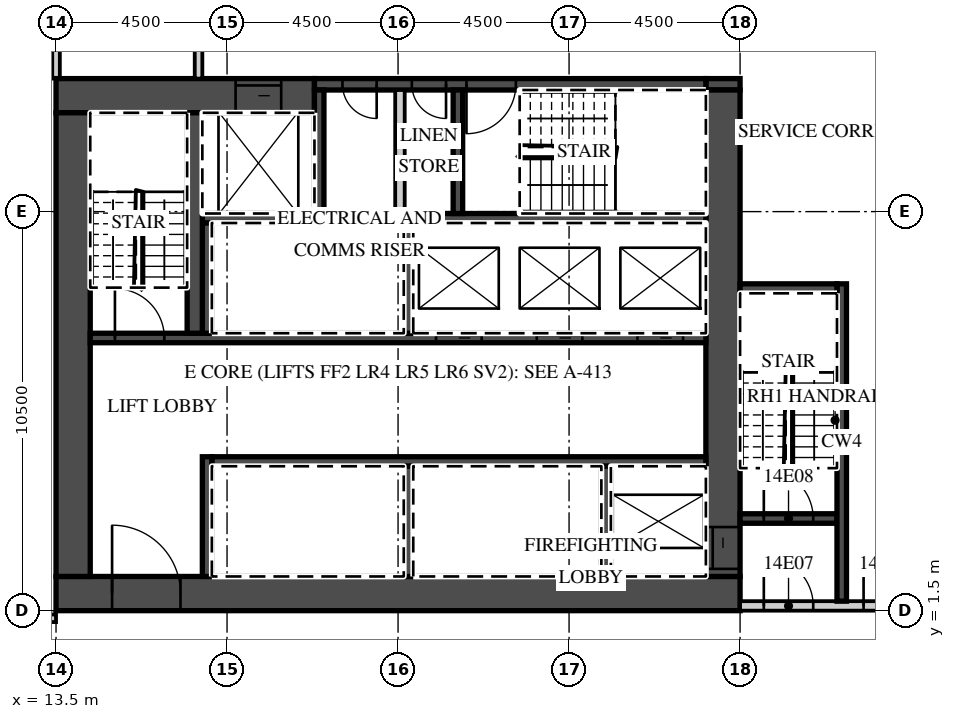
"""IFC4 building model, lengths in metres.
Left out: names, types, materials, properties, quantities, classifications, styles, units other than length and angle.
Written with IfcOpenShell. Run it as: python <this file> out.ifc"""

import sys

from ifc_helpers import new_model, si_unit, direction, frame, frame_2d, origin, place, context, subcontext, project, spatial, rectangle, extrude, element, fill, save


model = new_model("IFC4")
c1 = context("Model", 3, precision=1e-05, world=origin(), true_north=direction((0.0, 1.0)))
c2 = subcontext(c1, "Body", "Model", "MODEL_VIEW")
j1 = project(units=[si_unit("LENGTHUNIT", "METRE"), si_unit("PLANEANGLEUNIT", "RADIAN")], contexts=[c1])
p1 = place(None, origin())
s1 = spatial("IfcSite", under=j1, at=p1, CompositionType="ELEMENT")
p2 = place(p1, origin())
s2 = spatial("IfcBuilding", under=s1, at=p2, CompositionType="ELEMENT")
p3 = place(p2, frame((0.0, 0.0, 76.5)))
s3 = spatial("IfcBuildingStorey", under=s2, at=p3, CompositionType="ELEMENT", Elevation=76.5)
p4 = place(p3, frame((13.5, 15.5, 0.0), z_axis=(0.0, 0.0, 1.0), x_axis=(0.0, 1.0, 0.0)))
e1 = element("IfcWall", 1, at=p4, inside=s3, PredefinedType="PARTITIONING", context=c2, shape_type="SweptSolid", body=[
    extrude(rectangle(XDim=6.05, YDim=0.2, at=frame_2d((3.025, 0.0))), origin(), (0.0, 0.0, 1.0), 3.02),
])
p5 = place(p3, frame((-44.55, 1.3, 0.0), z_axis=(0.0, 0.0, 1.0), x_axis=(1.0, 0.0, 0.0)))
e2 = element("IfcWall", 2, at=p5, inside=s3, PredefinedType="PARTITIONING", context=c2, shape_type="SweptSolid", body=[
    extrude(rectangle(XDim=58.05, YDim=0.2, at=frame_2d((29.025, 0.0))), origin(), (0.0, 0.0, 1.0), 3.02),
])
p6 = place(p5, frame((0.525, 0.0, 0.0)))
e3 = element("IfcOpeningElement", 3, at=p6, cuts=e2, PredefinedType="OPENING", context=c2, shape_type="SweptSolid", body=[
    extrude(rectangle(XDim=1.0, YDim=2.1, at=frame_2d((0.5, 1.05))), frame((0.0, 0.11, 0.0), z_axis=(0.0, -1.0, 0.0), x_axis=(1.0, 0.0, 0.0)), (0.0, 0.0, 1.0), 0.22),
])
p7 = place(p5, frame((6.975, 0.0, 0.0)))
e4 = element("IfcOpeningElement", 4, at=p7, cuts=e2, PredefinedType="OPENING", context=c2, shape_type="SweptSolid", body=[
    extrude(rectangle(XDim=1.0, YDim=2.1, at=frame_2d((0.5, 1.05))), frame((0.0, 0.11, 0.0), z_axis=(0.0, -1.0, 0.0), x_axis=(1.0, 0.0, 0.0)), (0.0, 0.0, 1.0), 0.22),
])
p8 = place(p5, frame((9.125, 0.0, 0.0)))
e5 = element("IfcOpeningElement", 5, at=p8, cuts=e2, PredefinedType="OPENING", context=c2, shape_type="SweptSolid", body=[
    extrude(rectangle(XDim=1.0, YDim=2.1, at=frame_2d((0.5, 1.05))), frame((0.0, 0.11, 0.0), z_axis=(0.0, -1.0, 0.0), x_axis=(1.0, 0.0, 0.0)), (0.0, 0.0, 1.0), 0.22),
])
p9 = place(p5, frame((13.6, 0.0, 0.0)))
e6 = element("IfcOpeningElement", 6, at=p9, cuts=e2, PredefinedType="OPENING", context=c2, shape_type="SweptSolid", body=[
    extrude(rectangle(XDim=1.0, YDim=2.1, at=frame_2d((0.5, 1.05))), frame((0.0, 0.11, 0.0), z_axis=(0.0, -1.0, 0.0), x_axis=(1.0, 0.0, 0.0)), (0.0, 0.0, 1.0), 0.22),
])
p10 = place(p5, frame((19.987, 0.0, 0.0)))
e7 = element("IfcOpeningElement", 7, at=p10, cuts=e2, PredefinedType="OPENING", context=c2, shape_type="SweptSolid", body=[
    extrude(rectangle(XDim=1.2, YDim=2.1, at=frame_2d((0.6, 1.05))), frame((0.0, 0.11, 0.0), z_axis=(0.0, -1.0, 0.0), x_axis=(1.0, 0.0, 0.0)), (0.0, 0.0, 1.0), 0.22),
])
p11 = place(p5, frame((31.912, 0.0, 0.0)))
e8 = element("IfcOpeningElement", 8, at=p11, cuts=e2, PredefinedType="OPENING", context=c2, shape_type="SweptSolid", body=[
    extrude(rectangle(XDim=1.2, YDim=2.1, at=frame_2d((0.6, 1.05))), frame((0.0, 0.11, 0.0), z_axis=(0.0, -1.0, 0.0), x_axis=(1.0, 0.0, 0.0)), (0.0, 0.0, 1.0), 0.22),
])
p12 = place(p5, frame((38.5, 0.0, 0.0)))
e9 = element("IfcOpeningElement", 9, at=p12, cuts=e2, PredefinedType="OPENING", context=c2, shape_type="SweptSolid", body=[
    extrude(rectangle(XDim=1.0, YDim=2.1, at=frame_2d((0.5, 1.05))), frame((0.0, 0.11, 0.0), z_axis=(0.0, -1.0, 0.0), x_axis=(1.0, 0.0, 0.0)), (0.0, 0.0, 1.0), 0.22),
])
p13 = place(p5, frame((40.6, 0.0, 0.0)))
e10 = element("IfcOpeningElement", 10, at=p13, cuts=e2, PredefinedType="OPENING", context=c2, shape_type="SweptSolid", body=[
    extrude(rectangle(XDim=1.0, YDim=2.1, at=frame_2d((0.5, 1.05))), frame((0.0, 0.11, 0.0), z_axis=(0.0, -1.0, 0.0), x_axis=(1.0, 0.0, 0.0)), (0.0, 0.0, 1.0), 0.22),
])
p14 = place(p5, frame((47.5, 0.0, 0.0)))
e11 = element("IfcOpeningElement", 11, at=p14, cuts=e2, PredefinedType="OPENING", context=c2, shape_type="SweptSolid", body=[
    extrude(rectangle(XDim=1.0, YDim=2.1, at=frame_2d((0.5, 1.05))), frame((0.0, 0.11, 0.0), z_axis=(0.0, -1.0, 0.0), x_axis=(1.0, 0.0, 0.0)), (0.0, 0.0, 1.0), 0.22),
])
p15 = place(p5, frame((51.975, 0.0, 0.0)))
e12 = element("IfcOpeningElement", 12, at=p15, cuts=e2, PredefinedType="OPENING", context=c2, shape_type="SweptSolid", body=[
    extrude(rectangle(XDim=1.0, YDim=2.1, at=frame_2d((0.5, 1.05))), frame((0.0, 0.11, 0.0), z_axis=(0.0, -1.0, 0.0), x_axis=(1.0, 0.0, 0.0)), (0.0, 0.0, 1.0), 0.22),
])
p16 = place(p5, frame((56.475, 0.0, 0.0)))
e13 = element("IfcOpeningElement", 13, at=p16, cuts=e2, PredefinedType="OPENING", context=c2, shape_type="SweptSolid", body=[
    extrude(rectangle(XDim=1.0, YDim=2.1, at=frame_2d((0.5, 1.05))), frame((0.0, 0.11, 0.0), z_axis=(0.0, -1.0, 0.0), x_axis=(1.0, 0.0, 0.0)), (0.0, 0.0, 1.0), 0.22),
])
p17 = place(p3, frame((13.5, 1.95, 0.0), z_axis=(0.0, 0.0, 1.0), x_axis=(1.0, 0.0, 0.0)))
e14 = element("IfcWall", 14, at=p17, inside=s3, PredefinedType="SHEAR", context=c2, shape_type="SweptSolid", body=[
    extrude(rectangle(XDim=18.0, YDim=0.9, at=frame_2d((9.0, 0.0))), origin(), (0.0, 0.0, 1.0), 3.02),
])
p18 = place(p17, frame((1.475, 0.0, 0.0)))
e15 = element("IfcOpeningElement", 15, at=p18, cuts=e14, PredefinedType="OPENING", context=c2, shape_type="SweptSolid", body=[
    extrude(rectangle(XDim=1.8, YDim=2.1, at=frame_2d((0.9, 1.05))), frame((0.0, 0.46, 0.0), z_axis=(0.0, -1.0, 0.0), x_axis=(1.0, 0.0, 0.0)), (0.0, 0.0, 1.0), 0.92),
])
p19 = place(p3, frame((13.5, 15.05, 0.0), z_axis=(0.0, 0.0, 1.0), x_axis=(1.0, 0.0, 0.0)))
e16 = element("IfcWall", 16, at=p19, inside=s3, PredefinedType="SHEAR", context=c2, shape_type="SweptSolid", body=[
    extrude(rectangle(XDim=6.8, YDim=0.9, at=frame_2d((3.4, 0.0))), origin(), (0.0, 0.0, 1.0), 3.02),
])
p20 = place(p19, frame((4.725, 0.0, 0.0)))
e17 = element("IfcOpeningElement", 17, at=p20, cuts=e16, PredefinedType="OPENING", context=c2, shape_type="SweptSolid", body=[
    extrude(rectangle(XDim=1.2, YDim=2.1, at=frame_2d((0.6, 1.05))), frame((0.0, 0.46, 0.0), z_axis=(0.0, -1.0, 0.0), x_axis=(1.0, 0.0, 0.0)), (0.0, 0.0, 1.0), 0.92),
])
p21 = place(p3, frame((30.6, 15.35, 0.0), z_axis=(0.0, 0.0, 1.0), x_axis=(1.0, 0.0, 0.0)))
e18 = element("IfcWall", 18, at=p21, inside=s3, PredefinedType="SHEAR", context=c2, shape_type="SweptSolid", body=[
    extrude(rectangle(XDim=0.9, YDim=0.3, at=frame_2d((0.45, 0.0))), origin(), (0.0, 0.0, 1.0), 3.02),
])
p22 = place(p3, frame((20.3, 15.35, 0.0), z_axis=(0.0, 0.0, 1.0), x_axis=(1.0, 0.0, 0.0)))
e19 = element("IfcWall", 19, at=p22, inside=s3, PredefinedType="SHEAR", context=c2, shape_type="SweptSolid", body=[
    extrude(rectangle(XDim=10.3, YDim=0.3, at=frame_2d((5.15, 0.0))), origin(), (0.0, 0.0, 1.0), 3.02),
])
p23 = place(p22, frame((4.0, 0.0, 0.0)))
e20 = element("IfcOpeningElement", 20, at=p23, cuts=e19, PredefinedType="OPENING", context=c2, shape_type="SweptSolid", body=[
    extrude(rectangle(XDim=1.3, YDim=2.1, at=frame_2d((0.65, 1.05))), frame((0.0, 0.16, 0.0), z_axis=(0.0, -1.0, 0.0), x_axis=(1.0, 0.0, 0.0)), (0.0, 0.0, 1.0), 0.32),
])
p24 = place(p22, frame((2.562, 0.0, 0.0)))
e21 = element("IfcOpeningElement", 21, at=p24, cuts=e19, PredefinedType="OPENING", context=c2, shape_type="SweptSolid", body=[
    extrude(rectangle(XDim=0.9, YDim=2.1, at=frame_2d((0.45, 1.05))), frame((0.0, 0.16, 0.0), z_axis=(0.0, -1.0, 0.0), x_axis=(1.0, 0.0, 0.0)), (0.0, 0.0, 1.0), 0.32),
])
p25 = place(p22, frame((0.738, 0.0, 0.0)))
e22 = element("IfcOpeningElement", 22, at=p25, cuts=e19, PredefinedType="OPENING", context=c2, shape_type="SweptSolid", body=[
    extrude(rectangle(XDim=0.9, YDim=2.1, at=frame_2d((0.45, 1.05))), frame((0.0, 0.16, 0.0), z_axis=(0.0, -1.0, 0.0), x_axis=(1.0, 0.0, 0.0)), (0.0, 0.0, 1.0), 0.32),
])
p26 = place(p3, frame((31.05, 2.4, 0.0), z_axis=(0.0, 0.0, 1.0), x_axis=(0.0, 1.0, 0.0)))
e23 = element("IfcWall", 23, at=p26, inside=s3, PredefinedType="SHEAR", context=c2, shape_type="SweptSolid", body=[
    extrude(rectangle(XDim=12.8, YDim=0.9, at=frame_2d((6.4, 0.0))), origin(), (0.0, 0.0, 1.0), 3.02),
])
p27 = place(p26, frame((0.2, 0.0, 0.0)))
e24 = element("IfcOpeningElement", 24, at=p27, cuts=e23, PredefinedType="OPENING", context=c2, shape_type="SweptSolid", body=[
    extrude(rectangle(XDim=1.1, YDim=2.1, at=frame_2d((0.55, 1.05))), frame((0.0, 0.46, 0.0), z_axis=(0.0, -1.0, 0.0), x_axis=(1.0, 0.0, 0.0)), (0.0, 0.0, 1.0), 0.92),
])
p28 = place(p3, frame((13.95, 2.4, 0.0), z_axis=(0.0, 0.0, 1.0), x_axis=(0.0, 1.0, 0.0)))
e25 = element("IfcWall", 25, at=p28, inside=s3, PredefinedType="SHEAR", context=c2, shape_type="SweptSolid", body=[
    extrude(rectangle(XDim=12.2, YDim=0.9, at=frame_2d((6.1, 0.0))), origin(), (0.0, 0.0, 1.0), 3.02),
])
p29 = place(p3, frame((17.6, 5.425, 0.0), z_axis=(0.0, 0.0, 1.0), x_axis=(1.0, 0.0, 0.0)))
e26 = element("IfcWall", 26, at=p29, inside=s3, PredefinedType="SHEAR", context=c2, shape_type="SweptSolid", body=[
    extrude(rectangle(XDim=13.0, YDim=0.25, at=frame_2d((6.5, 0.0))), origin(), (0.0, 0.0, 1.0), 3.02),
])
p30 = place(p3, frame((17.475, 2.4, 0.0), z_axis=(0.0, 0.0, 1.0), x_axis=(0.0, 1.0, 0.0)))
e27 = element("IfcWall", 27, at=p30, inside=s3, PredefinedType="SHEAR", context=c2, shape_type="SweptSolid", body=[
    extrude(rectangle(XDim=3.15, YDim=0.25, at=frame_2d((1.575, 0.0))), origin(), (0.0, 0.0, 1.0), 3.02),
])
for number, where, z_axis, x_axis in (
    (28, (27.975, 2.4, 0.0), (0.0, 0.0, 1.0), (0.0, 1.0, 0.0)),
    (29, (22.775, 2.4, 0.0), (0.0, 0.0, 1.0), (0.0, 1.0, 0.0)),
):
    element("IfcWall", number, at=place(p3, frame(where, z_axis=z_axis, x_axis=x_axis)), inside=s3, PredefinedType="SHEAR", context=c2, shape_type="SweptSolid", body=[
        extrude(rectangle(XDim=2.9, YDim=0.25, at=frame_2d((1.45, 0.0))), origin(), (0.0, 0.0, 1.0), 3.02),
    ])
p31 = place(p3, frame((14.4, 8.675, 0.0), z_axis=(0.0, 0.0, 1.0), x_axis=(1.0, 0.0, 0.0)))
e30 = element("IfcWall", 30, at=p31, inside=s3, PredefinedType="SHEAR", context=c2, shape_type="SweptSolid", body=[
    extrude(rectangle(XDim=16.2, YDim=0.25, at=frame_2d((8.1, 0.0))), origin(), (0.0, 0.0, 1.0), 3.02),
])
p32 = place(p31, frame((14.4, 0.0, 0.0)))
e31 = element("IfcOpeningElement", 31, at=p32, cuts=e30, PredefinedType="OPENING", context=c2, shape_type="SweptSolid", body=[
    extrude(rectangle(XDim=1.2, YDim=2.1, at=frame_2d((0.6, 1.05))), frame((0.0, 0.135, 0.0), z_axis=(0.0, -1.0, 0.0), x_axis=(1.0, 0.0, 0.0)), (0.0, 0.0, 1.0), 0.27),
])
p33 = place(p31, frame((11.75, 0.0, 0.0)))
e32 = element("IfcOpeningElement", 32, at=p33, cuts=e30, PredefinedType="OPENING", context=c2, shape_type="SweptSolid", body=[
    extrude(rectangle(XDim=1.2, YDim=2.1, at=frame_2d((0.6, 1.05))), frame((0.0, 0.135, 0.0), z_axis=(0.0, -1.0, 0.0), x_axis=(1.0, 0.0, 0.0)), (0.0, 0.0, 1.0), 0.27),
])
p34 = place(p31, frame((9.1, 0.0, 0.0)))
e33 = element("IfcOpeningElement", 33, at=p34, cuts=e30, PredefinedType="OPENING", context=c2, shape_type="SweptSolid", body=[
    extrude(rectangle(XDim=1.2, YDim=2.1, at=frame_2d((0.6, 1.05))), frame((0.0, 0.135, 0.0), z_axis=(0.0, -1.0, 0.0), x_axis=(1.0, 0.0, 0.0)), (0.0, 0.0, 1.0), 0.27),
])
p35 = place(p31, frame((0.65, 0.0, 0.0)))
e34 = element("IfcOpeningElement", 34, at=p35, cuts=e30, PredefinedType="OPENING", context=c2, shape_type="SweptSolid", body=[
    extrude(rectangle(XDim=1.3, YDim=2.1, at=frame_2d((0.65, 1.05))), frame((0.0, 0.135, 0.0), z_axis=(0.0, -1.0, 0.0), x_axis=(1.0, 0.0, 0.0)), (0.0, 0.0, 1.0), 0.27),
])
p36 = place(p3, frame((17.35, 11.825, 0.0), z_axis=(0.0, 0.0, 1.0), x_axis=(1.0, 0.0, 0.0)))
e35 = element("IfcWall", 35, at=p36, inside=s3, PredefinedType="SHEAR", context=c2, shape_type="SweptSolid", body=[
    extrude(rectangle(XDim=13.25, YDim=0.25, at=frame_2d((6.625, 0.0))), origin(), (0.0, 0.0, 1.0), 3.02),
])
for number, where, z_axis, x_axis in (
    (36, (17.475, 8.8, 0.0), (0.0, 0.0, 1.0), (0.0, 1.0, 0.0)),
    (37, (22.775, 8.8, 0.0), (0.0, 0.0, 1.0), (0.0, 1.0, 0.0)),
):
    element("IfcWall", number, at=place(p3, frame(where, z_axis=z_axis, x_axis=x_axis)), inside=s3, PredefinedType="SHEAR", context=c2, shape_type="SweptSolid", body=[
        extrude(rectangle(XDim=2.9, YDim=0.25, at=frame_2d((1.45, 0.0))), origin(), (0.0, 0.0, 1.0), 3.02),
    ])
p37 = place(p3, frame((17.15, 8.8, 0.0), z_axis=(0.0, 0.0, 1.0), x_axis=(0.0, 1.0, 0.0)))
e38 = element("IfcWall", 38, at=p37, inside=s3, PredefinedType="SHEAR", context=c2, shape_type="SweptSolid", body=[
    extrude(rectangle(XDim=5.8, YDim=0.4, at=frame_2d((2.9, 0.0))), origin(), (0.0, 0.0, 1.0), 3.02),
])
for number, where, z_axis, x_axis in (
    (39, (20.425, 11.95, 0.0), (0.0, 0.0, 1.0), (0.0, 1.0, 0.0)),
    (40, (24.075, 11.95, 0.0), (0.0, 0.0, 1.0), (0.0, 1.0, 0.0)),
):
    element("IfcWall", number, at=place(p3, frame(where, z_axis=z_axis, x_axis=x_axis)), inside=s3, PredefinedType="SHEAR", context=c2, shape_type="SweptSolid", body=[
        extrude(rectangle(XDim=3.25, YDim=0.25, at=frame_2d((1.625, 0.0))), origin(), (0.0, 0.0, 1.0), 3.02),
    ])
p38 = place(p3, frame((22.55, 11.95, 0.0), z_axis=(0.0, 0.0, 1.0), x_axis=(0.0, 1.0, 0.0)))
e41 = element("IfcWall", 41, at=p38, inside=s3, PredefinedType="PARTITIONING", context=c2, shape_type="SweptSolid", body=[
    extrude(rectangle(XDim=3.25, YDim=0.25, at=frame_2d((1.625, 0.0))), origin(), (0.0, 0.0, 1.0), 3.02),
])
p39 = place(p3, frame((31.5, 1.625, 0.0), z_axis=(0.0, 0.0, 1.0), x_axis=(1.0, 0.0, 0.0)))
e42 = element("IfcWall", 42, at=p39, inside=s3, PredefinedType="PARTITIONING", context=c2, shape_type="SweptSolid", body=[
    extrude(rectangle(XDim=13.05, YDim=0.25, at=frame_2d((6.525, 0.0))), origin(), (0.0, 0.0, 1.0), 3.02),
])
p40 = place(p39, frame((0.625, 0.0, 0.0)))
e43 = element("IfcOpeningElement", 43, at=p40, cuts=e42, PredefinedType="OPENING", context=c2, shape_type="SweptSolid", body=[
    extrude(rectangle(XDim=1.3, YDim=2.1, at=frame_2d((0.65, 1.05))), frame((0.0, 0.135, 0.0), z_axis=(0.0, -1.0, 0.0), x_axis=(1.0, 0.0, 0.0)), (0.0, 0.0, 1.0), 0.27),
])
p41 = place(p39, frame((3.25, 0.0, 0.0)))
e44 = element("IfcOpeningElement", 44, at=p41, cuts=e42, PredefinedType="OPENING", context=c2, shape_type="SweptSolid", body=[
    extrude(rectangle(XDim=1.1, YDim=2.1, at=frame_2d((0.55, 1.05))), frame((0.0, 0.135, 0.0), z_axis=(0.0, -1.0, 0.0), x_axis=(1.0, 0.0, 0.0)), (0.0, 0.0, 1.0), 0.27),
])
p42 = place(p3, frame((31.5, 3.925, 0.0), z_axis=(0.0, 0.0, 1.0), x_axis=(1.0, 0.0, 0.0)))
e45 = element("IfcWall", 45, at=p42, inside=s3, PredefinedType="SHEAR", context=c2, shape_type="SweptSolid", body=[
    extrude(rectangle(XDim=2.55, YDim=0.25, at=frame_2d((1.275, 0.0))), origin(), (0.0, 0.0, 1.0), 3.02),
])
p43 = place(p42, frame((0.625, 0.0, 0.0)))
e46 = element("IfcOpeningElement", 46, at=p43, cuts=e45, PredefinedType="OPENING", context=c2, shape_type="SweptSolid", body=[
    extrude(rectangle(XDim=1.3, YDim=2.1, at=frame_2d((0.65, 1.05))), frame((0.0, 0.135, 0.0), z_axis=(0.0, -1.0, 0.0), x_axis=(1.0, 0.0, 0.0)), (0.0, 0.0, 1.0), 0.27),
])
p44 = place(p3, frame((34.175, 1.75, 0.0), z_axis=(0.0, 0.0, 1.0), x_axis=(0.0, 1.0, 0.0)))
e47 = element("IfcWall", 47, at=p44, inside=s3, PredefinedType="SHEAR", context=c2, shape_type="SweptSolid", body=[
    extrude(rectangle(XDim=8.35, YDim=0.25, at=frame_2d((4.175, 0.0))), origin(), (0.0, 0.0, 1.0), 3.02),
])
p45 = place(p3, frame((31.5, 9.975, 0.0), z_axis=(0.0, 0.0, 1.0), x_axis=(1.0, 0.0, 0.0)))
e48 = element("IfcWall", 48, at=p45, inside=s3, PredefinedType="SHEAR", context=c2, shape_type="SweptSolid", body=[
    extrude(rectangle(XDim=2.55, YDim=0.25, at=frame_2d((1.275, 0.0))), origin(), (0.0, 0.0, 1.0), 3.02),
])
p46 = place(p3, frame((17.25, 15.5, 0.0), z_axis=(0.0, 0.0, 1.0), x_axis=(0.0, 1.0, 0.0)))
e49 = element("IfcWall", 49, at=p46, inside=s3, PredefinedType="PARTITIONING", context=c2, shape_type="SweptSolid", body=[
    extrude(rectangle(XDim=2.2, YDim=0.2, at=frame_2d((1.1, 0.0))), origin(), (0.0, 0.0, 1.0), 3.02),
])
p47 = place(p32, origin())
e50 = element("IfcDoor", 50, at=p47, inside=s3, OperationType="SLIDING_TO_LEFT", PredefinedType="DOOR", context=c2, shape_type="SweptSolid", body=[
    extrude(rectangle(XDim=1.2, YDim=2.1, at=frame_2d((0.6, 1.05))), frame((0.0, 0.025, 0.0), z_axis=(0.0, -1.0, 0.0), x_axis=(1.0, 0.0, 0.0)), (0.0, 0.0, 1.0), 0.05),
])
fill(e31, e50)
p48 = place(p33, origin())
e51 = element("IfcDoor", 51, at=p48, inside=s3, OperationType="SLIDING_TO_RIGHT", PredefinedType="DOOR", context=c2, shape_type="SweptSolid", body=[
    extrude(rectangle(XDim=1.2, YDim=2.1, at=frame_2d((0.6, 1.05))), frame((0.0, 0.025, 0.0), z_axis=(0.0, -1.0, 0.0), x_axis=(1.0, 0.0, 0.0)), (0.0, 0.0, 1.0), 0.05),
])
fill(e32, e51)
p49 = place(p34, origin())
e52 = element("IfcDoor", 52, at=p49, inside=s3, OperationType="SLIDING_TO_RIGHT", PredefinedType="DOOR", context=c2, shape_type="SweptSolid", body=[
    extrude(rectangle(XDim=1.2, YDim=2.1, at=frame_2d((0.6, 1.05))), frame((0.0, 0.025, 0.0), z_axis=(0.0, -1.0, 0.0), x_axis=(1.0, 0.0, 0.0)), (0.0, 0.0, 1.0), 0.05),
])
fill(e33, e52)
p50 = place(p20, origin())
e53 = element("IfcDoor", 53, at=p50, inside=s3, OperationType="SLIDING_TO_LEFT", PredefinedType="DOOR", context=c2, shape_type="SweptSolid", body=[
    extrude(rectangle(XDim=1.2, YDim=2.1, at=frame_2d((0.6, 1.05))), frame((0.0, 0.025, 0.0), z_axis=(0.0, -1.0, 0.0), x_axis=(1.0, 0.0, 0.0)), (0.0, 0.0, 1.0), 0.05),
])
fill(e17, e53)
p51 = place(p27, origin())
e54 = element("IfcDoor", 54, at=p51, inside=s3, OperationType="SLIDING_TO_LEFT", PredefinedType="DOOR", context=c2, shape_type="SweptSolid", body=[
    extrude(rectangle(XDim=1.1, YDim=2.1, at=frame_2d((0.55, 1.05))), frame((0.0, 0.025, 0.0), z_axis=(0.0, -1.0, 0.0), x_axis=(1.0, 0.0, 0.0)), (0.0, 0.0, 1.0), 0.05),
])
fill(e24, e54)
p52 = place(p18, origin())
e55 = element("IfcDoor", 55, at=p52, inside=s3, OperationType="DOUBLE_DOOR_DOUBLE_SWING", PredefinedType="DOOR", context=c2, shape_type="SweptSolid", body=[
    extrude(rectangle(XDim=1.8, YDim=2.1, at=frame_2d((0.9, 1.05))), frame((0.0, 0.025, 0.0), z_axis=(0.0, -1.0, 0.0), x_axis=(1.0, 0.0, 0.0)), (0.0, 0.0, 1.0), 0.05),
])
fill(e15, e55)
p53 = place(p40, origin())
e56 = element("IfcDoor", 56, at=p53, inside=s3, OperationType="SINGLE_SWING_LEFT", PredefinedType="DOOR", context=c2, shape_type="SweptSolid", body=[
    extrude(rectangle(XDim=1.3, YDim=2.1, at=frame_2d((0.65, 1.05))), frame((0.0, 0.025, 0.0), z_axis=(0.0, -1.0, 0.0), x_axis=(1.0, 0.0, 0.0)), (0.0, 0.0, 1.0), 0.05),
])
fill(e43, e56)
p54 = place(p43, origin())
e57 = element("IfcDoor", 57, at=p54, inside=s3, OperationType="SINGLE_SWING_LEFT", PredefinedType="DOOR", context=c2, shape_type="SweptSolid", body=[
    extrude(rectangle(XDim=1.3, YDim=2.1, at=frame_2d((0.65, 1.05))), frame((0.0, 0.025, 0.0), z_axis=(0.0, -1.0, 0.0), x_axis=(1.0, 0.0, 0.0)), (0.0, 0.0, 1.0), 0.05),
])
fill(e46, e57)
p55 = place(p41, origin())
e58 = element("IfcDoor", 58, at=p55, inside=s3, OperationType="SINGLE_SWING_LEFT", PredefinedType="DOOR", context=c2, shape_type="SweptSolid", body=[
    extrude(rectangle(XDim=1.1, YDim=2.1, at=frame_2d((0.55, 1.05))), frame((0.0, 0.025, 0.0), z_axis=(0.0, -1.0, 0.0), x_axis=(1.0, 0.0, 0.0)), (0.0, 0.0, 1.0), 0.05),
])
fill(e44, e58)
p56 = place(p35, origin())
e59 = element("IfcDoor", 59, at=p56, inside=s3, OperationType="SINGLE_SWING_LEFT", PredefinedType="DOOR", context=c2, shape_type="SweptSolid", body=[
    extrude(rectangle(XDim=1.3, YDim=2.1, at=frame_2d((0.65, 1.05))), frame((0.0, 0.025, 0.0), z_axis=(0.0, -1.0, 0.0), x_axis=(1.0, 0.0, 0.0)), (0.0, 0.0, 1.0), 0.05),
])
fill(e34, e59)
p57 = place(p23, origin())
e60 = element("IfcDoor", 60, at=p57, inside=s3, OperationType="SINGLE_SWING_LEFT", PredefinedType="DOOR", context=c2, shape_type="SweptSolid", body=[
    extrude(rectangle(XDim=1.3, YDim=2.1, at=frame_2d((0.65, 1.05))), frame((0.0, 0.025, 0.0), z_axis=(0.0, -1.0, 0.0), x_axis=(1.0, 0.0, 0.0)), (0.0, 0.0, 1.0), 0.05),
])
fill(e20, e60)
p58 = place(p24, origin())
e61 = element("IfcDoor", 61, at=p58, inside=s3, OperationType="SINGLE_SWING_RIGHT", PredefinedType="DOOR", context=c2, shape_type="SweptSolid", body=[
    extrude(rectangle(XDim=0.9, YDim=2.1, at=frame_2d((0.45, 1.05))), frame((0.0, 0.025, 0.0), z_axis=(0.0, -1.0, 0.0), x_axis=(1.0, 0.0, 0.0)), (0.0, 0.0, 1.0), 0.05),
])
fill(e21, e61)
p59 = place(p25, origin())
e62 = element("IfcDoor", 62, at=p59, inside=s3, OperationType="SINGLE_SWING_RIGHT", PredefinedType="DOOR", context=c2, shape_type="SweptSolid", body=[
    extrude(rectangle(XDim=0.9, YDim=2.1, at=frame_2d((0.45, 1.05))), frame((0.0, 0.025, 0.0), z_axis=(0.0, -1.0, 0.0), x_axis=(1.0, 0.0, 0.0)), (0.0, 0.0, 1.0), 0.05),
])
fill(e22, e62)
save(model, sys.argv[1])
